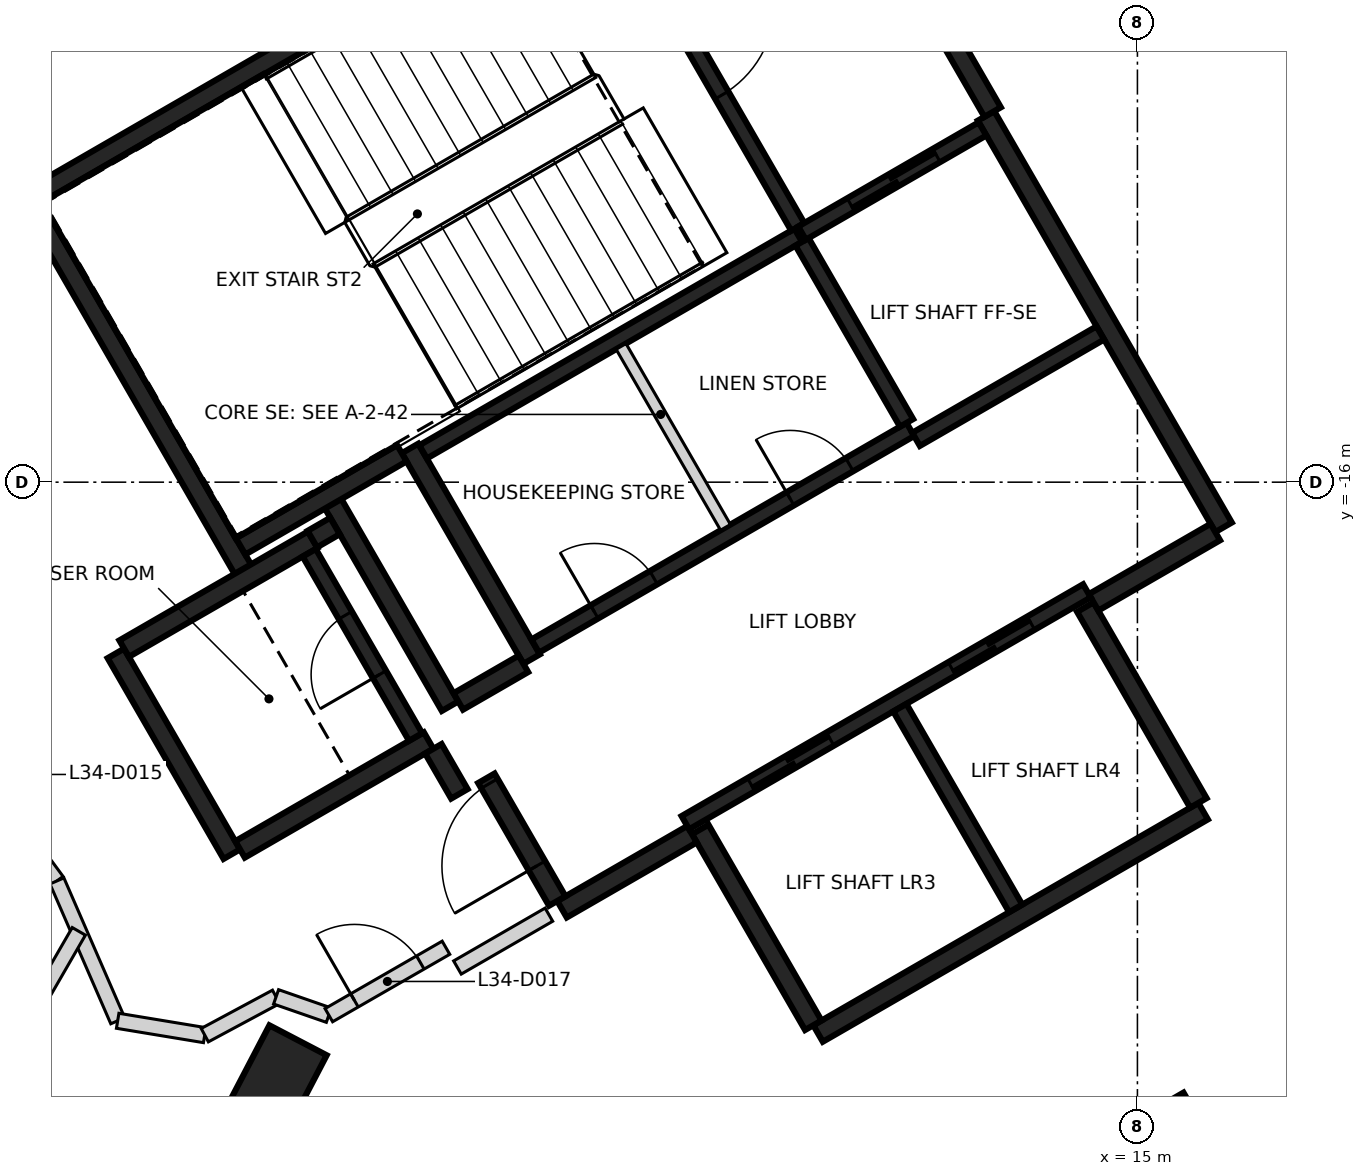
"""IFC4 building model, lengths in metres.
Left out: names, types, materials, properties, quantities, classifications, styles, units other than length and angle.
Written with IfcOpenShell. Run it as: python <this file> out.ifc"""

import sys

from ifc_helpers import new_model, si_unit, direction, frame, frame_2d, origin, origin_2d, place, context, subcontext, project, spatial, rectangle, extrude, element, fill, save


model = new_model("IFC4")
c1 = context("Model", 3, precision=1e-05, world=origin(), true_north=direction((0.0, 1.0)))
c2 = subcontext(c1, "Body", "Model", "MODEL_VIEW")
j1 = project(units=[si_unit("LENGTHUNIT", "METRE"), si_unit("PLANEANGLEUNIT", "RADIAN")], contexts=[c1])
p1 = place(None, origin())
s1 = spatial("IfcSite", under=j1, at=p1, CompositionType="ELEMENT")
p2 = place(p1, origin())
s2 = spatial("IfcBuilding", under=s1, at=p2, CompositionType="ELEMENT")
p3 = place(p2, frame((0.0, 0.0, 139.6)))
s3 = spatial("IfcBuildingStorey", under=s2, at=p3, CompositionType="ELEMENT", Elevation=139.6)
p4 = place(p3, frame((3.667, -23.896, -0.4), z_axis=(0.0, 0.0, 1.0), x_axis=(0.463006774365, 0.886354740999, 0.0)))
e1 = element("IfcColumn", 1, at=p4, inside=s3, PredefinedType="COLUMN", context=c2, shape_type="SweptSolid", body=[
    extrude(rectangle(XDim=1.25, YDim=0.85, at=origin_2d()), origin(), (0.0, 0.0, 1.0), 3.6),
])
p5 = place(p3, frame((15.207, -26.34, -0.4), z_axis=(0.0, 0.0, 1.0), x_axis=(-0.5, 0.866025403784, 0.0)))
e2 = element("IfcColumn", 2, at=p5, inside=s3, PredefinedType="COLUMN", context=c2, shape_type="SweptSolid", body=[
    extrude(rectangle(XDim=3.6, YDim=3.0, at=origin_2d()), origin(), (0.0, 0.0, 1.0), 3.6),
])
p6 = place(p3, frame((0.417, -12.273, 0.0), z_axis=(0.0, 0.0, 1.0), x_axis=(0.866021906294, 0.500006057782, 0.0)))
e3 = element("IfcWall", 3, at=p6, inside=s3, PredefinedType="SHEAR", context=c2, shape_type="SweptSolid", body=[
    extrude(rectangle(XDim=11.55, YDim=0.25, at=frame_2d((5.775, 0.0))), origin(), (0.0, 0.0, 1.0), 3.2),
])
p7 = place(p6, frame((10.025, 0.0, 0.0)))
e4 = element("IfcOpeningElement", 4, at=p7, cuts=e3, PredefinedType="OPENING", context=c2, shape_type="SweptSolid", body=[
    extrude(rectangle(XDim=1.2, YDim=2.1, at=frame_2d((0.6, 1.05))), frame((0.0, 0.135, 0.0), z_axis=(0.0, -1.0, 0.0), x_axis=(1.0, 0.0, 0.0)), (0.0, 0.0, 1.0), 0.27),
])
p8 = place(p6, frame((8.725, 0.0, 0.0)))
e5 = element("IfcOpeningElement", 5, at=p8, cuts=e3, PredefinedType="OPENING", context=c2, shape_type="SweptSolid", body=[
    extrude(rectangle(XDim=1.2, YDim=2.1, at=frame_2d((0.6, 1.05))), frame((0.0, 0.135, 0.0), z_axis=(0.0, -1.0, 0.0), x_axis=(1.0, 0.0, 0.0)), (0.0, 0.0, 1.0), 0.27),
])
p9 = place(p3, frame((13.008, -11.181, 0.0), z_axis=(0.0, 0.0, 1.0), x_axis=(0.500004234368, -0.866022959057, 0.0)))
e6 = element("IfcWall", 6, at=p9, inside=s3, PredefinedType="SHEAR", context=c2, shape_type="SweptSolid", body=[
    extrude(rectangle(XDim=6.25, YDim=0.25, at=frame_2d((3.125, 0.0))), origin(), (0.0, 0.0, 1.0), 3.2),
])
p10 = place(p3, frame((15.865, -20.328, 0.0), z_axis=(0.0, 0.0, 1.0), x_axis=(-0.86602852612, -0.499994591916, 0.0)))
e7 = element("IfcWall", 7, at=p10, inside=s3, PredefinedType="SHEAR", context=c2, shape_type="SweptSolid", body=[
    extrude(rectangle(XDim=5.85, YDim=0.25, at=frame_2d((2.925, 0.0))), origin(), (0.0, 0.0, 1.0), 3.2),
])
p11 = place(p3, frame((3.235, -17.153, 0.0), z_axis=(0.0, 0.0, 1.0), x_axis=(-0.500008851346, 0.866020293397, 0.0)))
e8 = element("IfcWall", 8, at=p11, inside=s3, PredefinedType="SHEAR", context=c2, shape_type="SweptSolid", body=[
    extrude(rectangle(XDim=5.51, YDim=0.25, at=frame_2d((2.755, 0.0))), origin(), (0.0, 0.0, 1.0), 3.2),
])
p12 = place(p3, frame((10.483, -6.606, 0.0), z_axis=(0.0, 0.0, 1.0), x_axis=(0.49999885962, -0.866026062182, 0.0)))
e9 = element("IfcWall", 9, at=p12, inside=s3, PredefinedType="SHEAR", context=c2, shape_type="SweptSolid", body=[
    extrude(rectangle(XDim=5.225, YDim=0.25, at=frame_2d((2.612, 0.0))), origin(), (0.0, 0.0, 1.0), 3.2),
])
p13 = place(p3, frame((7.031, -18.327, 0.0), z_axis=(0.0, 0.0, 1.0), x_axis=(-0.499971222258, 0.866042017984, 0.0)))
e10 = element("IfcWall", 10, at=p13, inside=s3, PredefinedType="SHEAR", context=c2, shape_type="SweptSolid", body=[
    extrude(rectangle(XDim=3.2, YDim=0.25, at=frame_2d((1.6, 0.0))), origin(), (0.0, 0.0, 1.0), 3.2),
])
for number, where, z_axis, x_axis in (
    (11, (14.315, -17.644, 0.0), (0.0, 0.0, 1.0), (0.5, -0.866, 0.0)),
    (12, (10.736, -23.145, 0.0), (0.0, 0.0, 1.0), (-0.5, 0.866, 0.0)),
):
    element("IfcWall", number, at=place(p3, frame(where, z_axis=z_axis, x_axis=x_axis)), inside=s3, PredefinedType="SHEAR", context=c2, shape_type="SweptSolid", body=[
        extrude(rectangle(XDim=2.974, YDim=0.25, at=frame_2d((1.487, 0.0))), origin(), (0.0, 0.0, 1.0), 3.2),
    ])
p14 = place(p3, frame((3.085, -20.894, 0.0), z_axis=(0.0, 0.0, 1.0), x_axis=(-0.499978833458, 0.866037623948, 0.0)))
e13 = element("IfcWall", 13, at=p14, inside=s3, PredefinedType="SHEAR", context=c2, shape_type="SweptSolid", body=[
    extrude(rectangle(XDim=3.05, YDim=0.25, at=frame_2d((1.525, 0.0))), origin(), (0.0, 0.0, 1.0), 3.2),
])
p15 = place(p3, frame((1.669, -18.19, 0.0), z_axis=(0.0, 0.0, 1.0), x_axis=(0.866042235819, 0.499970844928, 0.0)))
e14 = element("IfcWall", 14, at=p15, inside=s3, PredefinedType="SHEAR", context=c2, shape_type="SweptSolid", body=[
    extrude(rectangle(XDim=2.865, YDim=0.25, at=frame_2d((1.432, 0.0))), origin(), (0.0, 0.0, 1.0), 3.2),
])
p16 = place(p3, frame((5.675, -19.399, 0.0), z_axis=(0.0, 0.0, 1.0), x_axis=(-0.866026637627, -0.499997862916, 0.0)))
e15 = element("IfcWall", 15, at=p16, inside=s3, PredefinedType="SHEAR", context=c2, shape_type="SweptSolid", body=[
    extrude(rectangle(XDim=2.865, YDim=0.25, at=frame_2d((1.432, 0.0))), origin(), (0.0, 0.0, 1.0), 3.2),
])
p17 = place(p3, frame((4.414, -16.276, 0.0), z_axis=(0.0, 0.0, 1.0), x_axis=(0.500003324108, -0.866023484601, 0.0)))
e16 = element("IfcWall", 16, at=p17, inside=s3, PredefinedType="SHEAR", context=c2, shape_type="SweptSolid", body=[
    extrude(rectangle(XDim=3.085, YDim=0.25, at=frame_2d((1.542, 0.0))), origin(), (0.0, 0.0, 1.0), 3.2),
])
p18 = place(p3, frame((5.322, -15.619, 0.0), z_axis=(0.0, 0.0, 1.0), x_axis=(-0.866026229868, -0.499998569178, 0.0)))
e17 = element("IfcWall", 17, at=p18, inside=s3, PredefinedType="SHEAR", context=c2, shape_type="SweptSolid", body=[
    extrude(rectangle(XDim=2.449, YDim=0.25, at=frame_2d((1.225, 0.0))), origin(), (0.0, 0.0, 1.0), 3.2),
])
p19 = place(p3, frame((9.14, -20.631, 0.0), z_axis=(0.0, 0.0, 1.0), x_axis=(-0.866043531843, -0.499968599967, 0.0)))
e18 = element("IfcWall", 18, at=p19, inside=s3, PredefinedType="SHEAR", context=c2, shape_type="SweptSolid", body=[
    extrude(rectangle(XDim=1.975, YDim=0.25, at=frame_2d((0.987, 0.0))), origin(), (0.0, 0.0, 1.0), 3.2),
])
p20 = place(p3, frame((16.025, -16.656, 0.0), z_axis=(0.0, 0.0, 1.0), x_axis=(-0.866016279763, -0.500015802937, 0.0)))
e19 = element("IfcWall", 19, at=p20, inside=s3, PredefinedType="SHEAR", context=c2, shape_type="SweptSolid", body=[
    extrude(rectangle(XDim=1.849, YDim=0.25, at=frame_2d((0.925, 0.0))), origin(), (0.0, 0.0, 1.0), 3.2),
])
p21 = place(p3, frame((7.367, -21.51, 0.0), z_axis=(0.0, 0.0, 1.0), x_axis=(-0.499983108224, 0.866035156036, 0.0)))
e20 = element("IfcWall", 20, at=p21, inside=s3, PredefinedType="SHEAR", context=c2, shape_type="SweptSolid", body=[
    extrude(rectangle(XDim=1.865, YDim=0.25, at=frame_2d((0.932, 0.0))), origin(), (0.0, 0.0, 1.0), 3.2),
])
p22 = place(p21, frame((0.535, 0.0, 0.0)))
e21 = element("IfcOpeningElement", 21, at=p22, cuts=e20, PredefinedType="OPENING", context=c2, shape_type="SweptSolid", body=[
    extrude(rectangle(XDim=1.25, YDim=2.1, at=frame_2d((0.625, 1.05))), frame((0.0, 0.135, 0.0), z_axis=(0.0, -1.0, 0.0), x_axis=(1.0, 0.0, 0.0)), (0.0, 0.0, 1.0), 0.27),
])
p23 = place(p3, frame((6.065, -18.885, 0.0), z_axis=(0.0, 0.0, 1.0), x_axis=(0.866017078145, 0.500014420154, 0.0)))
e22 = element("IfcWall", 22, at=p23, inside=s3, PredefinedType="SHEAR", context=c2, shape_type="SweptSolid", body=[
    extrude(rectangle(XDim=0.989, YDim=0.25, at=frame_2d((0.495, 0.0))), origin(), (0.0, 0.0, 1.0), 3.2),
])
p24 = place(p3, frame((6.08, -20.1, 0.0), z_axis=(0.0, 0.0, 1.0), x_axis=(-0.500051773299, 0.865995510393, 0.0)))
e23 = element("IfcWall", 23, at=p24, inside=s3, PredefinedType="SHEAR", context=c2, shape_type="SweptSolid", body=[
    extrude(rectangle(XDim=0.685, YDim=0.25, at=frame_2d((0.342, 0.0))), origin(), (0.0, 0.0, 1.0), 3.2),
])
p25 = place(p3, frame((4.145, -16.749, 0.0), z_axis=(0.0, 0.0, 1.0), x_axis=(0.866185586049, 0.49972245349, 0.0)))
e24 = element("IfcWall", 24, at=p25, inside=s3, PredefinedType="SHEAR", context=c2, shape_type="SweptSolid", body=[
    extrude(rectangle(XDim=0.344, YDim=0.25, at=frame_2d((0.172, 0.0))), origin(), (0.0, 0.0, 1.0), 3.2),
])
p26 = place(p3, frame((9.052, -20.48, 0.0), z_axis=(0.0, 0.0, 1.0), x_axis=(0.866030299012, 0.499991521122, 0.0)))
e25 = element("IfcWall", 25, at=p26, inside=s3, PredefinedType="SHEAR", context=c2, shape_type="SweptSolid", body=[
    extrude(rectangle(XDim=6.1, YDim=0.2, at=frame_2d((3.05, 0.0))), origin(), (0.0, 0.0, 1.0), 3.2),
])
p27 = place(p26, frame((1.0, 0.0, 0.0)))
e26 = element("IfcOpeningElement", 26, at=p27, cuts=e25, PredefinedType="OPENING", context=c2, shape_type="SweptSolid", body=[
    extrude(rectangle(XDim=1.2, YDim=2.1, at=frame_2d((0.6, 1.05))), frame((0.0, 0.11, 0.0), z_axis=(0.0, -1.0, 0.0), x_axis=(1.0, 0.0, 0.0)), (0.0, 0.0, 1.0), 0.22),
])
p28 = place(p26, frame((4.05, 0.0, 0.0)))
e27 = element("IfcOpeningElement", 27, at=p28, cuts=e25, PredefinedType="OPENING", context=c2, shape_type="SweptSolid", body=[
    extrude(rectangle(XDim=1.2, YDim=2.1, at=frame_2d((0.6, 1.05))), frame((0.0, 0.11, 0.0), z_axis=(0.0, -1.0, 0.0), x_axis=(1.0, 0.0, 0.0)), (0.0, 0.0, 1.0), 0.22),
])
p29 = place(p3, frame((10.538, -12.752, 0.0), z_axis=(0.0, 0.0, 1.0), x_axis=(-0.866038630372, -0.499977090179, 0.0)))
e28 = element("IfcWall", 28, at=p29, inside=s3, PredefinedType="SHEAR", context=c2, shape_type="SweptSolid", body=[
    extrude(rectangle(XDim=5.699, YDim=0.2, at=frame_2d((2.85, 0.0))), origin(), (0.0, 0.0, 1.0), 3.2),
])
p30 = place(p3, frame((7.077, -18.156, 0.0), z_axis=(0.0, 0.0, 1.0), x_axis=(0.866038630372, 0.499977090179, 0.0)))
e29 = element("IfcWall", 29, at=p30, inside=s3, PredefinedType="SHEAR", context=c2, shape_type="SweptSolid", body=[
    extrude(rectangle(XDim=5.699, YDim=0.2, at=frame_2d((2.85, 0.0))), origin(), (0.0, 0.0, 1.0), 3.2),
])
p31 = place(p30, frame((0.899, 0.0, 0.0)))
e30 = element("IfcOpeningElement", 30, at=p31, cuts=e29, PredefinedType="OPENING", context=c2, shape_type="SweptSolid", body=[
    extrude(rectangle(XDim=0.9, YDim=2.1, at=frame_2d((0.45, 1.05))), frame((0.0, 0.11, 0.0), z_axis=(0.0, -1.0, 0.0), x_axis=(1.0, 0.0, 0.0)), (0.0, 0.0, 1.0), 0.22),
])
p32 = place(p30, frame((3.874, 0.0, 0.0)))
e31 = element("IfcOpeningElement", 31, at=p32, cuts=e29, PredefinedType="OPENING", context=c2, shape_type="SweptSolid", body=[
    extrude(rectangle(XDim=0.9, YDim=2.1, at=frame_2d((0.45, 1.05))), frame((0.0, 0.11, 0.0), z_axis=(0.0, -1.0, 0.0), x_axis=(1.0, 0.0, 0.0)), (0.0, 0.0, 1.0), 0.22),
])
p33 = place(p3, frame((7.906, -8.094, 0.0), z_axis=(0.0, 0.0, 1.0), x_axis=(0.500024287448, -0.866011380966, 0.0)))
e32 = element("IfcWall", 32, at=p33, inside=s3, PredefinedType="SHEAR", context=c2, shape_type="SweptSolid", body=[
    extrude(rectangle(XDim=5.251, YDim=0.2, at=frame_2d((2.625, 0.0))), origin(), (0.0, 0.0, 1.0), 3.2),
])
p34 = place(p33, frame((1.849, 0.0, 0.0)))
e33 = element("IfcOpeningElement", 33, at=p34, cuts=e32, PredefinedType="OPENING", context=c2, shape_type="SweptSolid", body=[
    extrude(rectangle(XDim=1.4, YDim=2.1, at=frame_2d((0.7, 1.05))), frame((0.0, 0.11, 0.0), z_axis=(0.0, -1.0, 0.0), x_axis=(1.0, 0.0, 0.0)), (0.0, 0.0, 1.0), 0.22),
])
p35 = place(p3, frame((11.875, -18.967, 0.0), z_axis=(0.0, 0.0, 1.0), x_axis=(0.49998131003, -0.866036194175, 0.0)))
e34 = element("IfcWall", 34, at=p35, inside=s3, PredefinedType="SHEAR", context=c2, shape_type="SweptSolid", body=[
    extrude(rectangle(XDim=3.048, YDim=0.2, at=frame_2d((1.524, 0.0))), origin(), (0.0, 0.0, 1.0), 3.2),
])
p36 = place(p3, frame((5.503, -19.352, 0.0), z_axis=(0.0, 0.0, 1.0), x_axis=(-0.499986818241, 0.866033014143, 0.0)))
e35 = element("IfcWall", 35, at=p36, inside=s3, PredefinedType="SHEAR", context=c2, shape_type="SweptSolid", body=[
    extrude(rectangle(XDim=2.798, YDim=0.2, at=frame_2d((1.399, 0.0))), origin(), (0.0, 0.0, 1.0), 3.2),
])
p37 = place(p36, frame((0.949, 0.0, 0.0)))
e36 = element("IfcOpeningElement", 36, at=p37, cuts=e35, PredefinedType="OPENING", context=c2, shape_type="SweptSolid", body=[
    extrude(rectangle(XDim=0.9, YDim=2.1, at=frame_2d((0.45, 1.05))), frame((0.0, 0.11, 0.0), z_axis=(0.0, -1.0, 0.0), x_axis=(1.0, 0.0, 0.0)), (0.0, 0.0, 1.0), 0.22),
])
p38 = place(p3, frame((11.963, -15.22, 0.0), z_axis=(0.0, 0.0, 1.0), x_axis=(-0.500034990121, 0.866005201286, 0.0)))
e37 = element("IfcWall", 37, at=p38, inside=s3, PredefinedType="SHEAR", context=c2, shape_type="SweptSolid", body=[
    extrude(rectangle(XDim=2.75, YDim=0.2, at=frame_2d((1.375, 0.0))), origin(), (0.0, 0.0, 1.0), 3.2),
])
p39 = place(p3, frame((10.587, -12.723, 0.0), z_axis=(0.0, 0.0, 1.0), x_axis=(0.866037306777, 0.499979382845, 0.0)))
e38 = element("IfcWall", 38, at=p39, inside=s3, PredefinedType="SHEAR", context=c2, shape_type="SweptSolid", body=[
    extrude(rectangle(XDim=2.742, YDim=0.2, at=frame_2d((1.371, 0.0))), origin(), (0.0, 0.0, 1.0), 3.2),
])
p40 = place(p39, frame((0.743, 0.0, 0.0)))
e39 = element("IfcOpeningElement", 39, at=p40, cuts=e38, PredefinedType="OPENING", context=c2, shape_type="SweptSolid", body=[
    extrude(rectangle(XDim=1.3, YDim=2.1, at=frame_2d((0.65, 1.05))), frame((0.0, 0.11, 0.0), z_axis=(0.0, -1.0, 0.0), x_axis=(1.0, 0.0, 0.0)), (0.0, 0.0, 1.0), 0.22),
])
p41 = place(p3, frame((14.512, -14.037, 0.0), z_axis=(0.0, 0.0, 1.0), x_axis=(-0.866044696403, -0.499966582715, 0.0)))
e40 = element("IfcWall", 40, at=p41, inside=s3, PredefinedType="SHEAR", context=c2, shape_type="SweptSolid", body=[
    extrude(rectangle(XDim=2.799, YDim=0.2, at=frame_2d((1.399, 0.0))), origin(), (0.0, 0.0, 1.0), 3.2),
])
p42 = place(p3, frame((8.207, -14.214, 0.0), z_axis=(0.0, 0.0, 1.0), x_axis=(0.50002746344, -0.86600954718, 0.0)))
e41 = element("IfcWall", 41, at=p42, inside=s3, PredefinedType="PARTITIONING", context=c2, shape_type="SweptSolid", body=[
    extrude(rectangle(XDim=2.748, YDim=0.15, at=frame_2d((1.374, 0.0))), origin(), (0.0, 0.0, 1.0), 3.2),
])
p43 = place(p3, frame((-0.858, -19.016, 0.0), z_axis=(0.0, 0.0, 1.0), x_axis=(0.593123867414, -0.805111220829, 0.0)))
e42 = element("IfcWall", 42, at=p43, inside=s3, PredefinedType="PARTITIONING", context=c2, shape_type="SweptSolid", body=[
    extrude(rectangle(XDim=2.77, YDim=0.2, at=frame_2d((1.385, 0.0))), origin(), (0.0, 0.0, 1.0), 3.2),
])
p44 = place(p43, frame((0.555, 0.0, 0.0)))
e43 = element("IfcOpeningElement", 43, at=p44, cuts=e42, PredefinedType="OPENING", context=c2, shape_type="SweptSolid", body=[
    extrude(rectangle(XDim=0.95, YDim=2.1, at=frame_2d((0.475, 1.05))), frame((0.0, 0.11, 0.0), z_axis=(0.0, -1.0, 0.0), x_axis=(1.0, 0.0, 0.0)), (0.0, 0.0, 1.0), 0.22),
])
p45 = place(p3, frame((0.785, -21.246, 0.0), z_axis=(0.0, 0.0, 1.0), x_axis=(0.398864077761, -0.917010058545, 0.0)))
e44 = element("IfcWall", 44, at=p45, inside=s3, PredefinedType="PARTITIONING", context=c2, shape_type="SweptSolid", body=[
    extrude(rectangle(XDim=2.006, YDim=0.2, at=frame_2d((1.003, 0.0))), origin(), (0.0, 0.0, 1.0), 2.3),
])
p46 = place(p3, frame((1.584, -23.086, 0.0), z_axis=(0.0, 0.0, 1.0), x_axis=(0.986654221629, -0.162829502674, 0.0)))
e45 = element("IfcWall", 45, at=p46, inside=s3, PredefinedType="PARTITIONING", context=c2, shape_type="SweptSolid", body=[
    extrude(rectangle(XDim=1.16, YDim=0.2, at=frame_2d((0.58, 0.0))), origin(), (0.0, 0.0, 1.0), 2.3),
])
p47 = place(p3, frame((2.73, -23.275, 0.0), z_axis=(0.0, 0.0, 1.0), x_axis=(0.880927165636, 0.473251866182, 0.0)))
e46 = element("IfcWall", 46, at=p47, inside=s3, PredefinedType="PARTITIONING", context=c2, shape_type="SweptSolid", body=[
    extrude(rectangle(XDim=1.065, YDim=0.2, at=frame_2d((0.532, 0.0))), origin(), (0.0, 0.0, 1.0), 3.2),
])
p48 = place(p3, frame((3.668, -22.771, 0.0), z_axis=(0.0, 0.0, 1.0), x_axis=(0.944689393684, -0.327966384652, 0.0)))
e47 = element("IfcWall", 47, at=p48, inside=s3, PredefinedType="PARTITIONING", context=c2, shape_type="SweptSolid", body=[
    extrude(rectangle(XDim=0.735, YDim=0.2, at=frame_2d((0.367, 0.0))), origin(), (0.0, 0.0, 1.0), 3.2),
])
p49 = place(p3, frame((4.362, -23.012, 0.0), z_axis=(0.0, 0.0, 1.0), x_axis=(0.866692617793, 0.49884256661, 0.0)))
e48 = element("IfcWall", 48, at=p49, inside=s3, PredefinedType="PARTITIONING", context=c2, shape_type="SweptSolid", body=[
    extrude(rectangle(XDim=1.778, YDim=0.2, at=frame_2d((0.889, 0.0))), origin(), (0.0, 0.0, 1.0), 3.2),
])
p50 = place(p49, frame((0.389, 0.0, 0.0)))
e49 = element("IfcOpeningElement", 49, at=p50, cuts=e48, PredefinedType="OPENING", context=c2, shape_type="SweptSolid", body=[
    extrude(rectangle(XDim=1.0, YDim=2.1, at=frame_2d((0.5, 1.05))), frame((0.0, 0.11, 0.0), z_axis=(0.0, -1.0, 0.0), x_axis=(1.0, 0.0, 0.0)), (0.0, 0.0, 1.0), 0.22),
])
p51 = place(p3, frame((6.054, -22.385, 0.0), z_axis=(0.0, 0.0, 1.0), x_axis=(0.86593101922, 0.500163443238, 0.0)))
e50 = element("IfcWall", 50, at=p51, inside=s3, PredefinedType="PARTITIONING", context=c2, shape_type="SweptSolid", body=[
    extrude(rectangle(XDim=1.39, YDim=0.2, at=frame_2d((0.695, 0.0))), origin(), (0.0, 0.0, 1.0), 3.2),
])
p52 = place(p3, frame((-0.425, -24.505, 0.0), z_axis=(0.0, 0.0, 1.0), x_axis=(0.499915194772, 0.86607436057, 0.0)))
e51 = element("IfcWall", 51, at=p52, inside=s3, PredefinedType="PARTITIONING", context=c2, shape_type="SweptSolid", body=[
    extrude(rectangle(XDim=2.997, YDim=0.2, at=frame_2d((1.499, 0.0))), origin(), (0.0, 0.0, 1.0), 2.3),
])
p53 = place(p40, origin())
e52 = element("IfcDoor", 52, at=p53, inside=s3, OperationType="SLIDING_TO_LEFT", PredefinedType="DOOR", context=c2, shape_type="SweptSolid", body=[
    extrude(rectangle(XDim=1.3, YDim=2.1, at=frame_2d((0.65, 1.05))), frame((0.0, 0.025, 0.0), z_axis=(0.0, -1.0, 0.0), x_axis=(1.0, 0.0, 0.0)), (0.0, 0.0, 1.0), 0.05),
])
fill(e39, e52)
p54 = place(p27, origin())
e53 = element("IfcDoor", 53, at=p54, inside=s3, OperationType="DOUBLE_DOOR_SLIDING", PredefinedType="DOOR", context=c2, shape_type="SweptSolid", body=[
    extrude(rectangle(XDim=1.2, YDim=2.1, at=frame_2d((0.6, 1.05))), frame((0.0, 0.025, 0.0), z_axis=(0.0, -1.0, 0.0), x_axis=(1.0, 0.0, 0.0)), (0.0, 0.0, 1.0), 0.05),
])
fill(e26, e53)
p55 = place(p28, origin())
e54 = element("IfcDoor", 54, at=p55, inside=s3, OperationType="DOUBLE_DOOR_SLIDING", PredefinedType="DOOR", context=c2, shape_type="SweptSolid", body=[
    extrude(rectangle(XDim=1.2, YDim=2.1, at=frame_2d((0.6, 1.05))), frame((0.0, 0.025, 0.0), z_axis=(0.0, -1.0, 0.0), x_axis=(1.0, 0.0, 0.0)), (0.0, 0.0, 1.0), 0.05),
])
fill(e27, e54)
p56 = place(p22, origin())
e55 = element("IfcDoor", 55, at=p56, inside=s3, OperationType="SINGLE_SWING_LEFT", PredefinedType="DOOR", context=c2, shape_type="SweptSolid", body=[
    extrude(rectangle(XDim=1.25, YDim=2.1, at=frame_2d((0.625, 1.05))), frame((0.0, 0.025, 0.0), z_axis=(0.0, -1.0, 0.0), x_axis=(1.0, 0.0, 0.0)), (0.0, 0.0, 1.0), 0.05),
])
fill(e21, e55)
p57 = place(p34, origin())
e56 = element("IfcDoor", 56, at=p57, inside=s3, OperationType="SINGLE_SWING_LEFT", PredefinedType="DOOR", context=c2, shape_type="SweptSolid", body=[
    extrude(rectangle(XDim=1.4, YDim=2.1, at=frame_2d((0.7, 1.05))), frame((0.0, 0.025, 0.0), z_axis=(0.0, -1.0, 0.0), x_axis=(1.0, 0.0, 0.0)), (0.0, 0.0, 1.0), 0.05),
])
fill(e33, e56)
p58 = place(p31, origin())
e57 = element("IfcDoor", 57, at=p58, inside=s3, OperationType="SINGLE_SWING_RIGHT", PredefinedType="DOOR", context=c2, shape_type="SweptSolid", body=[
    extrude(rectangle(XDim=0.9, YDim=2.1, at=frame_2d((0.45, 1.05))), frame((0.0, 0.025, 0.0), z_axis=(0.0, -1.0, 0.0), x_axis=(1.0, 0.0, 0.0)), (0.0, 0.0, 1.0), 0.05),
])
fill(e30, e57)
p59 = place(p32, origin())
e58 = element("IfcDoor", 58, at=p59, inside=s3, OperationType="SINGLE_SWING_LEFT", PredefinedType="DOOR", context=c2, shape_type="SweptSolid", body=[
    extrude(rectangle(XDim=0.9, YDim=2.1, at=frame_2d((0.45, 1.05))), frame((0.0, 0.025, 0.0), z_axis=(0.0, -1.0, 0.0), x_axis=(1.0, 0.0, 0.0)), (0.0, 0.0, 1.0), 0.05),
])
fill(e31, e58)
p60 = place(p37, origin())
e59 = element("IfcDoor", 59, at=p60, inside=s3, OperationType="SINGLE_SWING_RIGHT", PredefinedType="DOOR", context=c2, shape_type="SweptSolid", body=[
    extrude(rectangle(XDim=0.9, YDim=2.1, at=frame_2d((0.45, 1.05))), frame((0.0, 0.025, 0.0), z_axis=(0.0, -1.0, 0.0), x_axis=(1.0, 0.0, 0.0)), (0.0, 0.0, 1.0), 0.05),
])
fill(e36, e59)
p61 = place(p50, frame((1.0, 0.0, 0.0), z_axis=(0.0, 0.0, 1.0), x_axis=(-1.0, 0.0, 0.0)))
e60 = element("IfcDoor", 60, at=p61, inside=s3, OperationType="SINGLE_SWING_LEFT", PredefinedType="DOOR", context=c2, shape_type="SweptSolid", body=[
    extrude(rectangle(XDim=1.0, YDim=2.1, at=frame_2d((0.5, 1.05))), frame((0.0, 0.025, 0.0), z_axis=(0.0, -1.0, 0.0), x_axis=(1.0, 0.0, 0.0)), (0.0, 0.0, 1.0), 0.05),
])
fill(e49, e60)
save(model, sys.argv[1])
